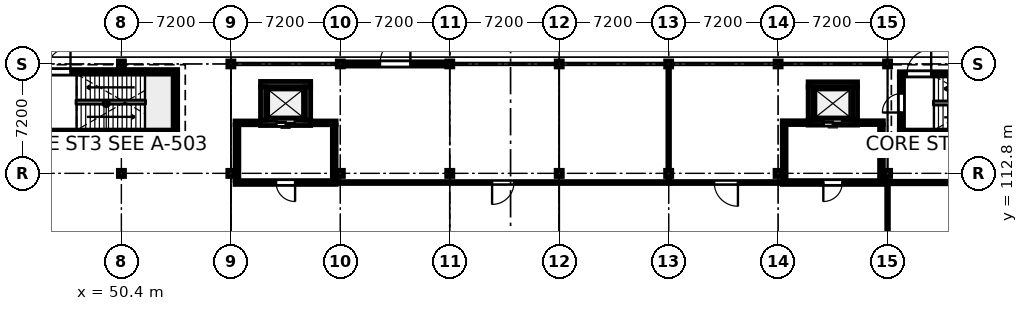
"""IFC4 building model, lengths in metres.
Left out: names, types, materials, properties, quantities, classifications, styles, units other than length and angle.
Written with IfcOpenShell. Run it as: python <this file> out.ifc"""

import sys

from ifc_helpers import new_model, si_unit, direction, frame, frame_2d, origin, origin_2d, place, context, subcontext, project, spatial, rectangle, i_section, extrude, element, fill, save


model = new_model("IFC4")
c1 = context("Model", 3, precision=1e-05, world=origin(), true_north=direction((0.0, 1.0)))
c2 = subcontext(c1, "Body", "Model", "MODEL_VIEW")
j1 = project(units=[si_unit("LENGTHUNIT", "METRE"), si_unit("PLANEANGLEUNIT", "RADIAN")], contexts=[c1])
p1 = place(None, origin())
s1 = spatial("IfcSite", under=j1, at=p1, CompositionType="ELEMENT")
p2 = place(p1, origin())
s2 = spatial("IfcBuilding", under=s1, at=p2, CompositionType="ELEMENT")
p3 = place(p2, origin())
s3 = spatial("IfcBuildingStorey", under=s2, at=p3, CompositionType="ELEMENT", Elevation=0.0)
p4 = place(p3, frame((50.4, 112.8, 0.0), z_axis=(0.0, 0.0, 1.0), x_axis=(1.0, 0.0, 0.0)))
e1 = element("IfcColumn", 1, at=p4, inside=s3, PredefinedType="COLUMN", context=c2, shape_type="SweptSolid", body=[
    extrude(i_section(OverallWidth=0.404, OverallDepth=0.406, WebThickness=0.027, FlangeThickness=0.044, FilletRadius=0.015, at=origin_2d()), origin(), (0.0, 0.0, 1.0), 5.4),
])
p5 = place(p3, frame((50.4, 120.0, 0.0), z_axis=(0.0, 0.0, 1.0), x_axis=(1.0, 0.0, 0.0)))
e2 = element("IfcColumn", 2, at=p5, inside=s3, PredefinedType="COLUMN", context=c2, shape_type="SweptSolid", body=[
    extrude(i_section(OverallWidth=0.399, OverallDepth=0.394, WebThickness=0.023, FlangeThickness=0.037, FilletRadius=0.015, at=origin_2d()), origin(), (0.0, 0.0, 1.0), 5.4),
])
p6 = place(p3, frame((57.6, 112.8, 0.0), z_axis=(0.0, 0.0, 1.0), x_axis=(1.0, 0.0, 0.0)))
e3 = element("IfcColumn", 3, at=p6, inside=s3, PredefinedType="COLUMN", context=c2, shape_type="SweptSolid", body=[
    extrude(i_section(OverallWidth=0.404, OverallDepth=0.406, WebThickness=0.027, FlangeThickness=0.044, FilletRadius=0.015, at=origin_2d()), origin(), (0.0, 0.0, 1.0), 5.4),
])
p7 = place(p3, frame((57.6, 120.0, 0.0), z_axis=(0.0, 0.0, 1.0), x_axis=(1.0, 0.0, 0.0)))
e4 = element("IfcColumn", 4, at=p7, inside=s3, PredefinedType="COLUMN", context=c2, shape_type="SweptSolid", body=[
    extrude(i_section(OverallWidth=0.399, OverallDepth=0.394, WebThickness=0.023, FlangeThickness=0.037, FilletRadius=0.015, at=origin_2d()), origin(), (0.0, 0.0, 1.0), 5.4),
])
p8 = place(p3, frame((64.8, 112.8, 0.0), z_axis=(0.0, 0.0, 1.0), x_axis=(1.0, 0.0, 0.0)))
e5 = element("IfcColumn", 5, at=p8, inside=s3, PredefinedType="COLUMN", context=c2, shape_type="SweptSolid", body=[
    extrude(i_section(OverallWidth=0.404, OverallDepth=0.406, WebThickness=0.027, FlangeThickness=0.044, FilletRadius=0.015, at=origin_2d()), origin(), (0.0, 0.0, 1.0), 5.4),
])
p9 = place(p3, frame((64.8, 120.0, 0.0), z_axis=(0.0, 0.0, 1.0), x_axis=(1.0, 0.0, 0.0)))
e6 = element("IfcColumn", 6, at=p9, inside=s3, PredefinedType="COLUMN", context=c2, shape_type="SweptSolid", body=[
    extrude(i_section(OverallWidth=0.399, OverallDepth=0.394, WebThickness=0.023, FlangeThickness=0.037, FilletRadius=0.015, at=origin_2d()), origin(), (0.0, 0.0, 1.0), 5.4),
])
p10 = place(p3, frame((72.0, 112.8, 0.0), z_axis=(0.0, 0.0, 1.0), x_axis=(1.0, 0.0, 0.0)))
e7 = element("IfcColumn", 7, at=p10, inside=s3, PredefinedType="COLUMN", context=c2, shape_type="SweptSolid", body=[
    extrude(i_section(OverallWidth=0.404, OverallDepth=0.406, WebThickness=0.027, FlangeThickness=0.044, FilletRadius=0.015, at=origin_2d()), origin(), (0.0, 0.0, 1.0), 5.4),
])
p11 = place(p3, frame((72.0, 120.0, 0.0), z_axis=(0.0, 0.0, 1.0), x_axis=(1.0, 0.0, 0.0)))
e8 = element("IfcColumn", 8, at=p11, inside=s3, PredefinedType="COLUMN", context=c2, shape_type="SweptSolid", body=[
    extrude(i_section(OverallWidth=0.399, OverallDepth=0.394, WebThickness=0.023, FlangeThickness=0.037, FilletRadius=0.015, at=origin_2d()), origin(), (0.0, 0.0, 1.0), 5.4),
])
p12 = place(p3, frame((79.2, 112.8, 0.0), z_axis=(0.0, 0.0, 1.0), x_axis=(1.0, 0.0, 0.0)))
e9 = element("IfcColumn", 9, at=p12, inside=s3, PredefinedType="COLUMN", context=c2, shape_type="SweptSolid", body=[
    extrude(i_section(OverallWidth=0.404, OverallDepth=0.406, WebThickness=0.027, FlangeThickness=0.044, FilletRadius=0.015, at=origin_2d()), origin(), (0.0, 0.0, 1.0), 5.4),
])
p13 = place(p3, frame((79.2, 120.0, 0.0), z_axis=(0.0, 0.0, 1.0), x_axis=(1.0, 0.0, 0.0)))
e10 = element("IfcColumn", 10, at=p13, inside=s3, PredefinedType="COLUMN", context=c2, shape_type="SweptSolid", body=[
    extrude(i_section(OverallWidth=0.399, OverallDepth=0.394, WebThickness=0.023, FlangeThickness=0.037, FilletRadius=0.015, at=origin_2d()), origin(), (0.0, 0.0, 1.0), 5.4),
])
p14 = place(p3, frame((86.4, 112.8, 0.0), z_axis=(0.0, 0.0, 1.0), x_axis=(1.0, 0.0, 0.0)))
e11 = element("IfcColumn", 11, at=p14, inside=s3, PredefinedType="COLUMN", context=c2, shape_type="SweptSolid", body=[
    extrude(i_section(OverallWidth=0.404, OverallDepth=0.406, WebThickness=0.027, FlangeThickness=0.044, FilletRadius=0.015, at=origin_2d()), origin(), (0.0, 0.0, 1.0), 5.4),
])
p15 = place(p3, frame((86.4, 120.0, 0.0), z_axis=(0.0, 0.0, 1.0), x_axis=(1.0, 0.0, 0.0)))
e12 = element("IfcColumn", 12, at=p15, inside=s3, PredefinedType="COLUMN", context=c2, shape_type="SweptSolid", body=[
    extrude(i_section(OverallWidth=0.399, OverallDepth=0.394, WebThickness=0.023, FlangeThickness=0.037, FilletRadius=0.015, at=origin_2d()), origin(), (0.0, 0.0, 1.0), 5.4),
])
p16 = place(p3, frame((93.6, 112.8, 0.0), z_axis=(0.0, 0.0, 1.0), x_axis=(1.0, 0.0, 0.0)))
e13 = element("IfcColumn", 13, at=p16, inside=s3, PredefinedType="COLUMN", context=c2, shape_type="SweptSolid", body=[
    extrude(i_section(OverallWidth=0.404, OverallDepth=0.406, WebThickness=0.027, FlangeThickness=0.044, FilletRadius=0.015, at=origin_2d()), origin(), (0.0, 0.0, 1.0), 5.4),
])
p17 = place(p3, frame((93.6, 120.0, 0.0), z_axis=(0.0, 0.0, 1.0), x_axis=(1.0, 0.0, 0.0)))
e14 = element("IfcColumn", 14, at=p17, inside=s3, PredefinedType="COLUMN", context=c2, shape_type="SweptSolid", body=[
    extrude(i_section(OverallWidth=0.399, OverallDepth=0.394, WebThickness=0.023, FlangeThickness=0.037, FilletRadius=0.015, at=origin_2d()), origin(), (0.0, 0.0, 1.0), 5.4),
])
p18 = place(p3, frame((100.8, 112.8, 0.0), z_axis=(0.0, 0.0, 1.0), x_axis=(1.0, 0.0, 0.0)))
e15 = element("IfcColumn", 15, at=p18, inside=s3, PredefinedType="COLUMN", context=c2, shape_type="SweptSolid", body=[
    extrude(i_section(OverallWidth=0.404, OverallDepth=0.406, WebThickness=0.027, FlangeThickness=0.044, FilletRadius=0.015, at=origin_2d()), origin(), (0.0, 0.0, 1.0), 5.4),
])
p19 = place(p3, frame((100.8, 120.0, 0.0), z_axis=(0.0, 0.0, 1.0), x_axis=(1.0, 0.0, 0.0)))
e16 = element("IfcColumn", 16, at=p19, inside=s3, PredefinedType="COLUMN", context=c2, shape_type="SweptSolid", body=[
    extrude(i_section(OverallWidth=0.399, OverallDepth=0.394, WebThickness=0.023, FlangeThickness=0.037, FilletRadius=0.015, at=origin_2d()), origin(), (0.0, 0.0, 1.0), 5.4),
])
p20 = place(p3, frame((65.007, 120.0, 0.0), z_axis=(0.0, 0.0, 1.0), x_axis=(1.0, 0.0, 0.0)))
e17 = element("IfcWall", 17, at=p20, inside=s3, PredefinedType="STANDARD", context=c2, shape_type="SweptSolid", body=[
    extrude(rectangle(XDim=6.786, YDim=0.28, at=frame_2d((3.393, 0.0))), origin(), (0.0, 0.0, 1.0), 4.462),
])
p21 = place(p20, frame((2.403, 0.0, 0.0)))
e18 = element("IfcOpeningElement", 18, at=p21, cuts=e17, PredefinedType="OPENING", context=c2, shape_type="SweptSolid", body=[
    extrude(rectangle(XDim=2.0, YDim=2.4, at=frame_2d((1.0, 1.2))), frame((0.0, 0.15, 0.0), z_axis=(0.0, -1.0, 0.0), x_axis=(1.0, 0.0, 0.0)), (0.0, 0.0, 1.0), 0.3),
])
p22 = place(p3, frame((54.1, 115.5, 0.0), z_axis=(0.0, 0.0, 1.0), x_axis=(-1.0, 0.0, 0.0)))
e19 = element("IfcWall", 19, at=p22, inside=s3, PredefinedType="SOLIDWALL", context=c2, shape_type="SweptSolid", body=[
    extrude(rectangle(XDim=9.4, YDim=0.3, at=frame_2d((4.7, 0.0))), origin(), (0.0, 0.0, 1.0), 5.16),
])
p23 = place(p3, frame((44.7, 119.48, 0.0), z_axis=(0.0, 0.0, 1.0), x_axis=(1.0, 0.0, 0.0)))
e20 = element("IfcWall", 20, at=p23, inside=s3, PredefinedType="SOLIDWALL", context=c2, shape_type="SweptSolid", body=[
    extrude(rectangle(XDim=9.4, YDim=0.3, at=frame_2d((4.7, 0.0))), origin(), (0.0, 0.0, 1.0), 5.16),
])
p24 = place(p23, frame((0.75, 0.0, 0.0)))
e21 = element("IfcOpeningElement", 21, at=p24, cuts=e20, PredefinedType="OPENING", context=c2, shape_type="SweptSolid", body=[
    extrude(rectangle(XDim=1.6, YDim=2.15, at=frame_2d((0.8, 1.075))), frame((0.0, 0.16, 0.0), z_axis=(0.0, -1.0, 0.0), x_axis=(1.0, 0.0, 0.0)), (0.0, 0.0, 1.0), 0.32),
])
p25 = place(p3, frame((53.95, 119.33, 0.0), z_axis=(0.0, 0.0, 1.0), x_axis=(0.0, -1.0, 0.0)))
e22 = element("IfcWall", 22, at=p25, inside=s3, PredefinedType="SOLIDWALL", context=c2, shape_type="SweptSolid", body=[
    extrude(rectangle(XDim=3.68, YDim=0.3, at=frame_2d((1.84, 0.0))), origin(), (0.0, 0.0, 1.0), 5.16),
])
p26 = place(p3, frame((110.475, 115.512, 0.0), z_axis=(0.0, 0.0, 1.0), x_axis=(-1.0, 0.0, 0.0)))
e23 = element("IfcWall", 23, at=p26, inside=s3, PredefinedType="SOLIDWALL", context=c2, shape_type="SweptSolid", body=[
    extrude(rectangle(XDim=8.9, YDim=0.275, at=frame_2d((4.45, 0.0))), origin(), (0.0, 0.0, 1.0), 5.16),
])
p27 = place(p3, frame((101.575, 119.348, 0.0), z_axis=(0.0, 0.0, 1.0), x_axis=(1.0, 0.0, 0.0)))
e24 = element("IfcWall", 24, at=p27, inside=s3, PredefinedType="SOLIDWALL", context=c2, shape_type="SweptSolid", body=[
    extrude(rectangle(XDim=8.9, YDim=0.275, at=frame_2d((4.45, 0.0))), origin(), (0.0, 0.0, 1.0), 5.16),
])
p28 = place(p27, frame((0.495, 0.0, 0.0)))
e25 = element("IfcOpeningElement", 25, at=p28, cuts=e24, PredefinedType="OPENING", context=c2, shape_type="SweptSolid", body=[
    extrude(rectangle(XDim=1.6, YDim=2.15, at=frame_2d((0.8, 1.075))), frame((0.0, 0.147, 0.0), z_axis=(0.0, -1.0, 0.0), x_axis=(1.0, 0.0, 0.0)), (0.0, 0.0, 1.0), 0.295),
])
p29 = place(p3, frame((101.712, 115.65, 0.0), z_axis=(0.0, 0.0, 1.0), x_axis=(0.0, 1.0, 0.0)))
e26 = element("IfcWall", 26, at=p29, inside=s3, PredefinedType="SOLIDWALL", context=c2, shape_type="SweptSolid", body=[
    extrude(rectangle(XDim=3.56, YDim=0.275, at=frame_2d((1.78, 0.0))), origin(), (0.0, 0.0, 1.0), 5.16),
])
p30 = place(p29, frame((1.155, 0.0, 0.0)))
e27 = element("IfcOpeningElement", 27, at=p30, cuts=e26, PredefinedType="OPENING", context=c2, shape_type="SweptSolid", body=[
    extrude(rectangle(XDim=1.25, YDim=2.2, at=frame_2d((0.625, 1.1))), frame((0.0, 0.147, 0.0), z_axis=(0.0, -1.0, 0.0), x_axis=(1.0, 0.0, 0.0)), (0.0, 0.0, 1.0), 0.295),
])
p31 = place(p3, frame((62.85, 116.125, 0.0), z_axis=(0.0, 0.0, 1.0), x_axis=(-1.0, 0.0, 0.0)))
e28 = element("IfcWall", 28, at=p31, inside=s3, PredefinedType="SHEAR", context=c2, shape_type="SweptSolid", body=[
    extrude(rectangle(XDim=3.3, YDim=0.35, at=frame_2d((1.65, 0.0))), origin(), (0.0, 0.0, 1.0), 5.16),
])
p32 = place(p31, frame((1.05, 0.0, 0.0)))
e29 = element("IfcOpeningElement", 29, at=p32, cuts=e28, PredefinedType="OPENING", context=c2, shape_type="SweptSolid", body=[
    extrude(rectangle(XDim=1.2, YDim=2.2, at=frame_2d((0.6, 1.1))), frame((0.0, 0.185, 0.0), z_axis=(0.0, -1.0, 0.0), x_axis=(1.0, 0.0, 0.0)), (0.0, 0.0, 1.0), 0.37),
])
p33 = place(p3, frame((59.55, 118.675, 0.0), z_axis=(0.0, 0.0, 1.0), x_axis=(1.0, 0.0, 0.0)))
e30 = element("IfcWall", 30, at=p33, inside=s3, PredefinedType="SHEAR", context=c2, shape_type="SweptSolid", body=[
    extrude(rectangle(XDim=3.3, YDim=0.35, at=frame_2d((1.65, 0.0))), origin(), (0.0, 0.0, 1.0), 5.16),
])
for number, where, z_axis, x_axis in (
    (31, (59.725, 116.3, 0.0), (0.0, 0.0, 1.0), (0.0, 1.0, 0.0)),
    (32, (62.675, 118.5, 0.0), (0.0, 0.0, 1.0), (0.0, -1.0, 0.0)),
):
    element("IfcWall", number, at=place(p3, frame(where, z_axis=z_axis, x_axis=x_axis)), inside=s3, PredefinedType="SHEAR", context=c2, shape_type="SweptSolid", body=[
        extrude(rectangle(XDim=2.2, YDim=0.35, at=frame_2d((1.1, 0.0))), origin(), (0.0, 0.0, 1.0), 5.16),
    ])
p34 = place(p3, frame((98.825, 116.138, 0.0), z_axis=(0.0, 0.0, 1.0), x_axis=(-1.0, 0.0, 0.0)))
e33 = element("IfcWall", 33, at=p34, inside=s3, PredefinedType="SHEAR", context=c2, shape_type="SweptSolid", body=[
    extrude(rectangle(XDim=3.25, YDim=0.325, at=frame_2d((1.625, 0.0))), origin(), (0.0, 0.0, 1.0), 5.16),
])
p35 = place(p34, frame((1.025, 0.0, 0.0)))
e34 = element("IfcOpeningElement", 34, at=p35, cuts=e33, PredefinedType="OPENING", context=c2, shape_type="SweptSolid", body=[
    extrude(rectangle(XDim=1.2, YDim=2.2, at=frame_2d((0.6, 1.1))), frame((0.0, 0.172, 0.0), z_axis=(0.0, -1.0, 0.0), x_axis=(1.0, 0.0, 0.0)), (0.0, 0.0, 1.0), 0.345),
])
p36 = place(p3, frame((95.575, 118.662, 0.0), z_axis=(0.0, 0.0, 1.0), x_axis=(1.0, 0.0, 0.0)))
e35 = element("IfcWall", 35, at=p36, inside=s3, PredefinedType="SHEAR", context=c2, shape_type="SweptSolid", body=[
    extrude(rectangle(XDim=3.25, YDim=0.325, at=frame_2d((1.625, 0.0))), origin(), (0.0, 0.0, 1.0), 5.16),
])
for number, where, z_axis, x_axis in (
    (36, (95.738, 116.3, 0.0), (0.0, 0.0, 1.0), (0.0, 1.0, 0.0)),
    (37, (98.662, 118.5, 0.0), (0.0, 0.0, 1.0), (0.0, -1.0, 0.0)),
):
    element("IfcWall", number, at=place(p3, frame(where, z_axis=z_axis, x_axis=x_axis)), inside=s3, PredefinedType="SHEAR", context=c2, shape_type="SweptSolid", body=[
        extrude(rectangle(XDim=2.2, YDim=0.325, at=frame_2d((1.1, 0.0))), origin(), (0.0, 0.0, 1.0), 5.16),
    ])
p37 = place(p3, frame((64.525, 112.2, 0.0), z_axis=(0.0, 0.0, 1.0), x_axis=(-1.0, 0.0, 0.0)))
e38 = element("IfcWall", 38, at=p37, inside=s3, PredefinedType="PARTITIONING", context=c2, shape_type="SweptSolid", body=[
    extrude(rectangle(XDim=6.65, YDim=0.25, at=frame_2d((3.325, 0.0))), origin(), (0.0, 0.0, 1.0), 4.457),
])
p38 = place(p37, frame((2.7, 0.0, 0.0)))
e39 = element("IfcOpeningElement", 39, at=p38, cuts=e38, PredefinedType="OPENING", context=c2, shape_type="SweptSolid", body=[
    extrude(rectangle(XDim=1.25, YDim=2.2, at=frame_2d((0.625, 1.1))), frame((0.0, 0.135, 0.0), z_axis=(0.0, -1.0, 0.0), x_axis=(1.0, 0.0, 0.0)), (0.0, 0.0, 1.0), 0.27),
])
p39 = place(p3, frame((57.875, 116.125, 0.0), z_axis=(0.0, 0.0, 1.0), x_axis=(1.0, 0.0, 0.0)))
e40 = element("IfcWall", 40, at=p39, inside=s3, PredefinedType="PARTITIONING", context=c2, shape_type="SweptSolid", body=[
    extrude(rectangle(XDim=1.673, YDim=0.25, at=frame_2d((0.836, 0.0))), origin(), (0.0, 0.0, 1.0), 4.457),
])
p40 = place(p3, frame((62.852, 116.125, 0.0), z_axis=(0.0, 0.0, 1.0), x_axis=(1.0, 0.0, 0.0)))
e41 = element("IfcWall", 41, at=p40, inside=s3, PredefinedType="PARTITIONING", context=c2, shape_type="SweptSolid", body=[
    extrude(rectangle(XDim=1.673, YDim=0.25, at=frame_2d((0.836, 0.0))), origin(), (0.0, 0.0, 1.0), 4.457),
])
for number, where, z_axis, x_axis in (
    (42, (58.0, 112.327, 0.0), (0.0, 0.0, 1.0), (0.0, 1.0, 0.0)),
    (43, (64.4, 115.998, 0.0), (0.0, 0.0, 1.0), (0.0, -1.0, 0.0)),
):
    element("IfcWall", number, at=place(p3, frame(where, z_axis=z_axis, x_axis=x_axis)), inside=s3, PredefinedType="PARTITIONING", context=c2, shape_type="SweptSolid", body=[
        extrude(rectangle(XDim=3.671, YDim=0.25, at=frame_2d((1.835, 0.0))), origin(), (0.0, 0.0, 1.0), 4.457),
    ])
p41 = place(p3, frame((100.525, 112.2, 0.0), z_axis=(0.0, 0.0, 1.0), x_axis=(-1.0, 0.0, 0.0)))
e44 = element("IfcWall", 44, at=p41, inside=s3, PredefinedType="PARTITIONING", context=c2, shape_type="SweptSolid", body=[
    extrude(rectangle(XDim=6.65, YDim=0.25, at=frame_2d((3.325, 0.0))), origin(), (0.0, 0.0, 1.0), 4.457),
])
p42 = place(p41, frame((2.7, 0.0, 0.0)))
e45 = element("IfcOpeningElement", 45, at=p42, cuts=e44, PredefinedType="OPENING", context=c2, shape_type="SweptSolid", body=[
    extrude(rectangle(XDim=1.25, YDim=2.2, at=frame_2d((0.625, 1.1))), frame((0.0, 0.135, 0.0), z_axis=(0.0, -1.0, 0.0), x_axis=(1.0, 0.0, 0.0)), (0.0, 0.0, 1.0), 0.27),
])
for number, where, z_axis, x_axis in (
    (46, (93.875, 116.138, 0.0), (0.0, 0.0, 1.0), (1.0, 0.0, 0.0)),
    (47, (98.827, 116.138, 0.0), (0.0, 0.0, 1.0), (1.0, 0.0, 0.0)),
):
    element("IfcWall", number, at=place(p3, frame(where, z_axis=z_axis, x_axis=x_axis)), inside=s3, PredefinedType="PARTITIONING", context=c2, shape_type="SweptSolid", body=[
        extrude(rectangle(XDim=1.698, YDim=0.25, at=frame_2d((0.849, 0.0))), origin(), (0.0, 0.0, 1.0), 4.457),
    ])
for number, where, z_axis, x_axis in (
    (48, (94.0, 112.327, 0.0), (0.0, 0.0, 1.0), (0.0, 1.0, 0.0)),
    (49, (100.4, 116.011, 0.0), (0.0, 0.0, 1.0), (0.0, -1.0, 0.0)),
):
    element("IfcWall", number, at=place(p3, frame(where, z_axis=z_axis, x_axis=x_axis)), inside=s3, PredefinedType="PARTITIONING", context=c2, shape_type="SweptSolid", body=[
        extrude(rectangle(XDim=3.684, YDim=0.25, at=frame_2d((1.842, 0.0))), origin(), (0.0, 0.0, 1.0), 4.457),
    ])
p43 = place(p3, frame((86.48, 112.2, 0.0), z_axis=(0.0, 0.0, 1.0), x_axis=(-1.0, 0.0, 0.0)))
e50 = element("IfcWall", 50, at=p43, inside=s3, PredefinedType="PARTITIONING", context=c2, shape_type="SweptSolid", body=[
    extrude(rectangle(XDim=21.953, YDim=0.125, at=frame_2d((10.977, 0.0))), origin(), (0.0, 0.0, 1.0), 4.457),
])
p44 = place(p43, frame((10.256, 0.0, 0.0)))
e51 = element("IfcOpeningElement", 51, at=p44, cuts=e50, PredefinedType="OPENING", context=c2, shape_type="SweptSolid", body=[
    extrude(rectangle(XDim=1.44, YDim=2.16, at=frame_2d((0.72, 1.08))), frame((0.0, 0.073, 0.0), z_axis=(0.0, -1.0, 0.0), x_axis=(1.0, 0.0, 0.0)), (0.0, 0.0, 1.0), 0.145),
])
p45 = place(p43, frame((15.196, 0.0, 0.95)))
e52 = element("IfcOpeningElement", 52, at=p45, cuts=e50, PredefinedType="OPENING", context=c2, shape_type="SweptSolid", body=[
    extrude(rectangle(XDim=1.75, YDim=1.15, at=frame_2d((0.875, 0.575))), frame((0.0, 0.073, 0.0), z_axis=(0.0, -1.0, 0.0), x_axis=(1.0, 0.0, 0.0)), (0.0, 0.0, 1.0), 0.145),
])
p46 = place(p3, frame((93.873, 112.2, 0.0), z_axis=(0.0, 0.0, 1.0), x_axis=(-1.0, 0.0, 0.0)))
e53 = element("IfcWall", 53, at=p46, inside=s3, PredefinedType="PARTITIONING", context=c2, shape_type="SweptSolid", body=[
    extrude(rectangle(XDim=7.391, YDim=0.13, at=frame_2d((3.696, 0.0))), origin(), (0.0, 0.0, 1.0), 4.457),
])
p47 = place(p46, frame((2.916, 0.0, 0.0)))
e54 = element("IfcOpeningElement", 54, at=p47, cuts=e53, PredefinedType="OPENING", context=c2, shape_type="SweptSolid", body=[
    extrude(rectangle(XDim=1.56, YDim=2.16, at=frame_2d((0.78, 1.08))), frame((0.0, 0.075, 0.0), z_axis=(0.0, -1.0, 0.0), x_axis=(1.0, 0.0, 0.0)), (0.0, 0.0, 1.0), 0.15),
])
p48 = place(p3, frame((100.72, 112.2, 0.0), z_axis=(0.0, 0.0, 1.0), x_axis=(1.0, 0.0, 0.0)))
e55 = element("IfcWall", 55, at=p48, inside=s3, PredefinedType="PARTITIONING", context=c2, shape_type="SweptSolid", body=[
    extrude(rectangle(XDim=7.36, YDim=0.165, at=frame_2d((3.68, 0.0))), origin(), (0.0, 0.0, 1.0), 4.457),
])
p49 = place(p3, frame((86.4, 119.858, 0.0), z_axis=(0.0, 0.0, 1.0), x_axis=(0.0, -1.0, 0.0)))
e56 = element("IfcWall", 56, at=p49, inside=s3, PredefinedType="PARTITIONING", context=c2, shape_type="SweptSolid", body=[
    extrude(rectangle(XDim=7.591, YDim=0.105, at=frame_2d((3.795, 0.0))), origin(), (0.0, 0.0, 1.0), 4.457),
])
p50 = place(p3, frame((100.8, 105.67, 0.0), z_axis=(0.0, 0.0, 1.0), x_axis=(0.0, 1.0, 0.0)))
e57 = element("IfcWall", 57, at=p50, inside=s3, PredefinedType="PARTITIONING", context=c2, shape_type="SweptSolid", body=[
    extrude(rectangle(XDim=6.446, YDim=0.11, at=frame_2d((3.223, 0.0))), origin(), (0.0, 0.0, 1.0), 4.457),
])
p51 = place(p21, origin())
e58 = element("IfcDoor", 58, at=p51, inside=s3, OperationType="SINGLE_SWING_RIGHT", PredefinedType="DOOR", context=c2, shape_type="SweptSolid", body=[
    extrude(rectangle(XDim=2.0, YDim=2.4, at=frame_2d((1.0, 1.2))), frame((0.0, 0.025, 0.0), z_axis=(0.0, -1.0, 0.0), x_axis=(1.0, 0.0, 0.0)), (0.0, 0.0, 1.0), 0.05),
])
fill(e18, e58)
p52 = place(p24, origin())
e59 = element("IfcDoor", 59, at=p52, inside=s3, OperationType="SINGLE_SWING_RIGHT", PredefinedType="DOOR", context=c2, shape_type="SweptSolid", body=[
    extrude(rectangle(XDim=1.6, YDim=2.15, at=frame_2d((0.8, 1.075))), frame((0.0, 0.025, 0.0), z_axis=(0.0, -1.0, 0.0), x_axis=(1.0, 0.0, 0.0)), (0.0, 0.0, 1.0), 0.05),
])
fill(e21, e59)
p53 = place(p28, origin())
e60 = element("IfcDoor", 60, at=p53, inside=s3, OperationType="SINGLE_SWING_RIGHT", PredefinedType="DOOR", context=c2, shape_type="SweptSolid", body=[
    extrude(rectangle(XDim=1.6, YDim=2.15, at=frame_2d((0.8, 1.075))), frame((0.0, 0.025, 0.0), z_axis=(0.0, -1.0, 0.0), x_axis=(1.0, 0.0, 0.0)), (0.0, 0.0, 1.0), 0.05),
])
fill(e25, e60)
p54 = place(p30, origin())
e61 = element("IfcDoor", 61, at=p54, inside=s3, OperationType="SINGLE_SWING_LEFT", PredefinedType="DOOR", context=c2, shape_type="SweptSolid", body=[
    extrude(rectangle(XDim=1.25, YDim=2.2, at=frame_2d((0.625, 1.1))), frame((0.0, 0.025, 0.0), z_axis=(0.0, -1.0, 0.0), x_axis=(1.0, 0.0, 0.0)), (0.0, 0.0, 1.0), 0.05),
])
fill(e27, e61)
p55 = place(p32, origin())
e62 = element("IfcDoor", 62, at=p55, inside=s3, OperationType="DOUBLE_DOOR_SLIDING", PredefinedType="DOOR", context=c2, shape_type="SweptSolid", body=[
    extrude(rectangle(XDim=1.2, YDim=2.2, at=frame_2d((0.6, 1.1))), frame((0.0, 0.025, 0.0), z_axis=(0.0, -1.0, 0.0), x_axis=(1.0, 0.0, 0.0)), (0.0, 0.0, 1.0), 0.05),
])
fill(e29, e62)
p56 = place(p35, origin())
e63 = element("IfcDoor", 63, at=p56, inside=s3, OperationType="DOUBLE_DOOR_SLIDING", PredefinedType="DOOR", context=c2, shape_type="SweptSolid", body=[
    extrude(rectangle(XDim=1.2, YDim=2.2, at=frame_2d((0.6, 1.1))), frame((0.0, 0.025, 0.0), z_axis=(0.0, -1.0, 0.0), x_axis=(1.0, 0.0, 0.0)), (0.0, 0.0, 1.0), 0.05),
])
fill(e34, e63)
p57 = place(p38, origin())
e64 = element("IfcDoor", 64, at=p57, inside=s3, OperationType="SINGLE_SWING_LEFT", PredefinedType="DOOR", context=c2, shape_type="SweptSolid", body=[
    extrude(rectangle(XDim=1.25, YDim=2.2, at=frame_2d((0.625, 1.1))), frame((0.0, 0.025, 0.0), z_axis=(0.0, -1.0, 0.0), x_axis=(1.0, 0.0, 0.0)), (0.0, 0.0, 1.0), 0.05),
])
fill(e39, e64)
p58 = place(p42, origin())
e65 = element("IfcDoor", 65, at=p58, inside=s3, OperationType="SINGLE_SWING_RIGHT", PredefinedType="DOOR", context=c2, shape_type="SweptSolid", body=[
    extrude(rectangle(XDim=1.25, YDim=2.2, at=frame_2d((0.625, 1.1))), frame((0.0, 0.025, 0.0), z_axis=(0.0, -1.0, 0.0), x_axis=(1.0, 0.0, 0.0)), (0.0, 0.0, 1.0), 0.05),
])
fill(e45, e65)
p59 = place(p44, origin())
e66 = element("IfcDoor", 66, at=p59, inside=s3, OperationType="SINGLE_SWING_RIGHT", PredefinedType="DOOR", context=c2, shape_type="SweptSolid", body=[
    extrude(rectangle(XDim=1.44, YDim=2.16, at=frame_2d((0.72, 1.08))), frame((0.0, 0.025, 0.0), z_axis=(0.0, -1.0, 0.0), x_axis=(1.0, 0.0, 0.0)), (0.0, 0.0, 1.0), 0.05),
])
fill(e51, e66)
p60 = place(p45, origin())
e67 = element("IfcWindow", 67, at=p60, inside=s3, PartitioningType="SINGLE_PANEL", PredefinedType="WINDOW", context=c2, shape_type="SweptSolid", body=[
    extrude(rectangle(XDim=1.75, YDim=1.15, at=frame_2d((0.875, 0.575))), frame((0.0, 0.03, 0.0), z_axis=(0.0, -1.0, 0.0), x_axis=(1.0, 0.0, 0.0)), (0.0, 0.0, 1.0), 0.06),
])
fill(e52, e67)
p61 = place(p47, origin())
e68 = element("IfcDoor", 68, at=p61, inside=s3, OperationType="SINGLE_SWING_LEFT", PredefinedType="DOOR", context=c2, shape_type="SweptSolid", body=[
    extrude(rectangle(XDim=1.56, YDim=2.16, at=frame_2d((0.78, 1.08))), frame((0.0, 0.025, 0.0), z_axis=(0.0, -1.0, 0.0), x_axis=(1.0, 0.0, 0.0)), (0.0, 0.0, 1.0), 0.05),
])
fill(e54, e68)
save(model, sys.argv[1])
